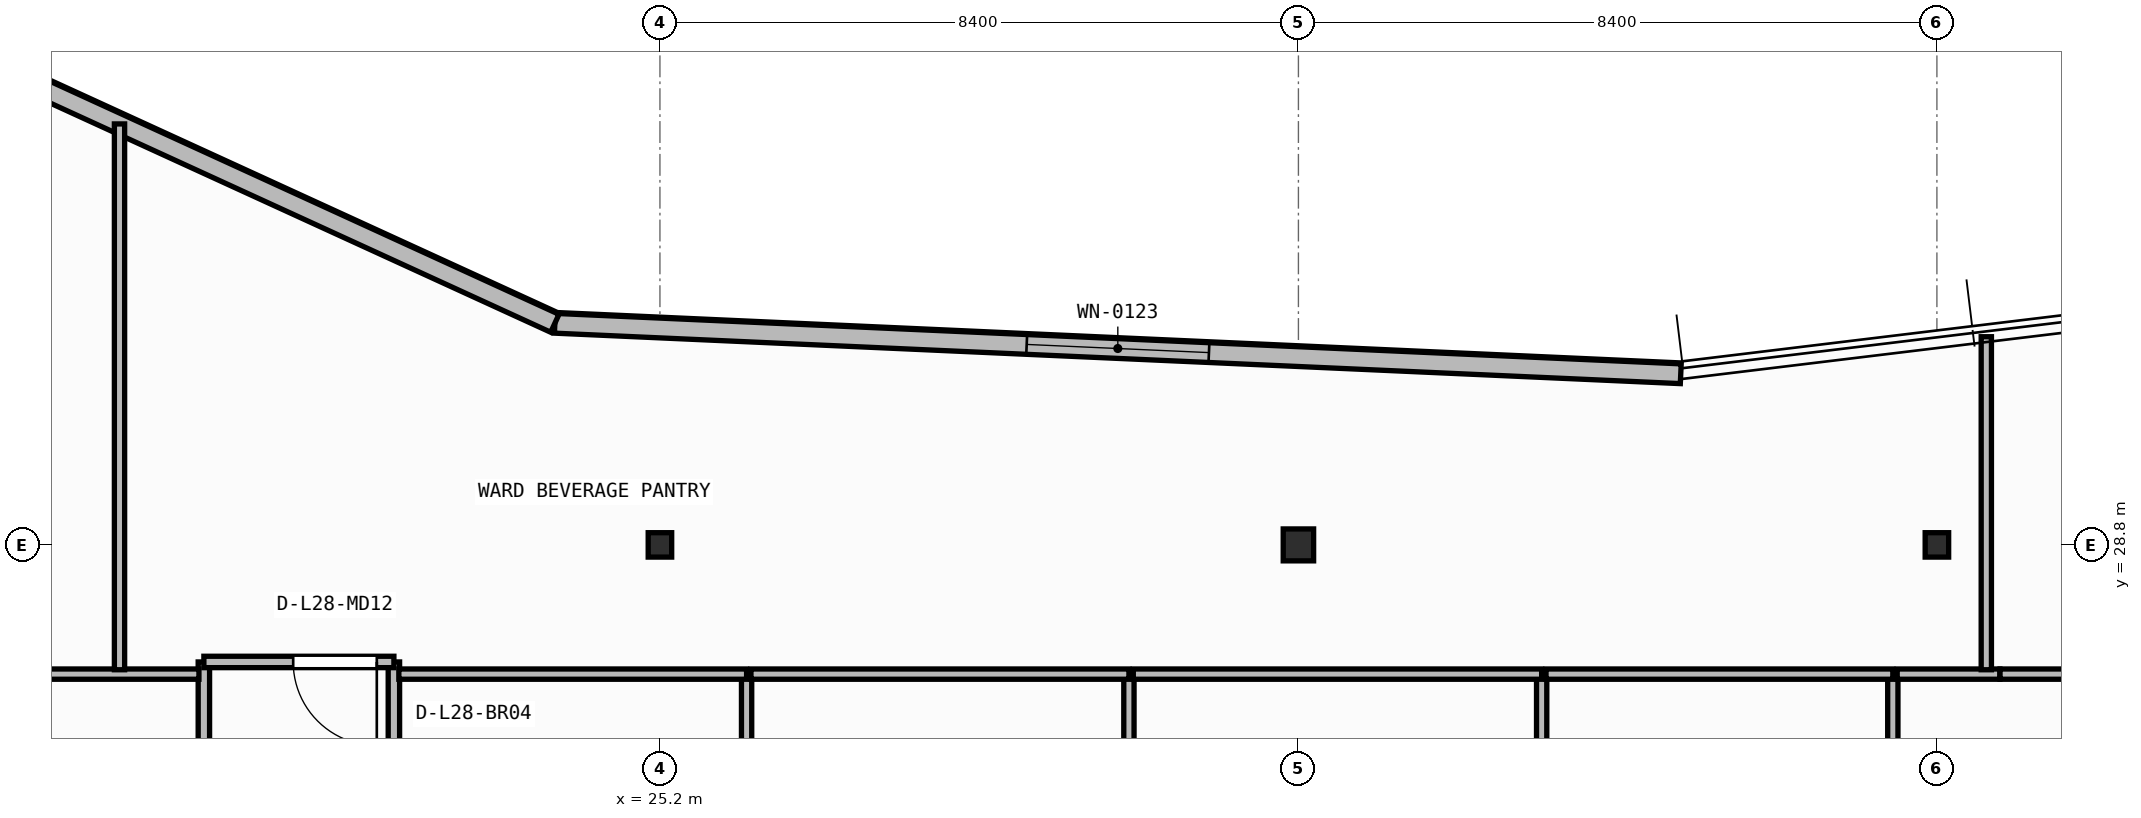
"""IFC4 building model, lengths in metres.
Left out: names, types, materials, properties, quantities, classifications, styles, units other than length and angle.
Written with IfcOpenShell. Run it as: python <this file> out.ifc"""

import sys

from ifc_helpers import new_model, si_unit, direction, frame, frame_2d, origin, origin_2d, place, context, subcontext, project, spatial, rectangle, i_section, extrude, element, fill, save


model = new_model("IFC4")
c1 = context("Model", 3, precision=1e-05, world=origin(), true_north=direction((0.0, 1.0)))
c2 = subcontext(c1, "Body", "Model", "MODEL_VIEW")
j1 = project(units=[si_unit("LENGTHUNIT", "METRE"), si_unit("PLANEANGLEUNIT", "RADIAN")], contexts=[c1])
p1 = place(None, origin())
s1 = spatial("IfcSite", under=j1, at=p1, CompositionType="ELEMENT")
p2 = place(p1, origin())
s2 = spatial("IfcBuilding", under=s1, at=p2, CompositionType="ELEMENT")
p3 = place(p2, frame((0.0, 0.0, 115.2)))
s3 = spatial("IfcBuildingStorey", under=s2, at=p3, CompositionType="ELEMENT", Elevation=115.2)
p4 = place(p3, frame((25.2, 28.8, 0.0), z_axis=(0.0, 0.0, 1.0), x_axis=(1.0, 0.0, 0.0)))
e1 = element("IfcColumn", 1, at=p4, inside=s3, PredefinedType="COLUMN", context=c2, shape_type="SweptSolid", body=[
    extrude(i_section(OverallWidth=0.309, OverallDepth=0.321, WebThickness=0.014, FlangeThickness=0.022, FilletRadius=0.017, at=origin_2d()), origin(), (0.0, 0.0, 1.0), 3.95),
])
p5 = place(p3, frame((33.6, 28.8, 0.0), z_axis=(0.0, 0.0, 1.0), x_axis=(1.0, 0.0, 0.0)))
e2 = element("IfcColumn", 2, at=p5, inside=s3, PredefinedType="COLUMN", context=c2, shape_type="SweptSolid", body=[
    extrude(i_section(OverallWidth=0.4, OverallDepth=0.42, WebThickness=0.025, FlangeThickness=0.04, at=origin_2d()), origin(), (0.0, 0.0, 1.0), 3.95),
])
p6 = place(p3, frame((42.0, 28.8, 0.0), z_axis=(0.0, 0.0, 1.0), x_axis=(1.0, 0.0, 0.0)))
e3 = element("IfcColumn", 3, at=p6, inside=s3, PredefinedType="COLUMN", context=c2, shape_type="SweptSolid", body=[
    extrude(i_section(OverallWidth=0.309, OverallDepth=0.321, WebThickness=0.014, FlangeThickness=0.022, FilletRadius=0.017, at=origin_2d()), origin(), (0.0, 0.0, 1.0), 3.95),
])
p7 = place(p3, frame((38.63, 31.052, 0.0), z_axis=(0.0, 0.0, 1.0), x_axis=(-0.998996592956, 0.044786239663, 0.0)))
e4 = element("IfcWall", 4, at=p7, inside=s3, PredefinedType="STANDARD", context=c2, shape_type="SweptSolid", body=[
    extrude(rectangle(XDim=14.827, YDim=0.26, at=frame_2d((7.414, 0.0))), origin(), (0.0, 0.0, 1.0), 3.71),
])
p8 = place(p7, frame((6.214, 0.0, 0.9)))
e5 = element("IfcOpeningElement", 5, at=p8, cuts=e4, PredefinedType="OPENING", context=c2, shape_type="SweptSolid", body=[
    extrude(rectangle(XDim=2.4, YDim=1.65, at=frame_2d((1.2, 0.825))), frame((0.0, 0.14, 0.0), z_axis=(0.0, -1.0, 0.0), x_axis=(1.0, 0.0, 0.0)), (0.0, 0.0, 1.0), 0.28),
])
p9 = place(p3, frame((23.818, 31.716, 0.0), z_axis=(0.0, 0.0, 1.0), x_axis=(-0.909209527513, 0.416338846471, 0.0)))
e6 = element("IfcWall", 6, at=p9, inside=s3, PredefinedType="STANDARD", context=c2, shape_type="SweptSolid", body=[
    extrude(rectangle(XDim=13.787, YDim=0.26, at=frame_2d((6.894, 0.0))), origin(), (0.0, 0.0, 1.0), 3.71),
])
p10 = place(p9, frame((8.854, 0.0, 0.9)))
e7 = element("IfcOpeningElement", 7, at=p10, cuts=e6, PredefinedType="OPENING", context=c2, shape_type="SweptSolid", body=[
    extrude(rectangle(XDim=2.4, YDim=1.65, at=frame_2d((1.2, 0.825))), frame((0.0, 0.14, 0.0), z_axis=(0.0, -1.0, 0.0), x_axis=(1.0, 0.0, 0.0)), (0.0, 0.0, 1.0), 0.28),
])
p11 = place(p3, frame((19.2, 27.26, 0.0), z_axis=(0.0, 0.0, 1.0), x_axis=(0.0, -1.0, 0.0)))
e8 = element("IfcWall", 8, at=p11, inside=s3, PredefinedType="PARTITIONING", context=c2, shape_type="SweptSolid", body=[
    extrude(rectangle(XDim=6.482, YDim=0.15, at=frame_2d((3.241, 0.0))), origin(), (0.0, 0.0, 1.0), 3.71),
])
p12 = place(p11, frame((2.068, 0.0, 0.0)))
e9 = element("IfcOpeningElement", 9, at=p12, cuts=e8, PredefinedType="OPENING", context=c2, shape_type="SweptSolid", body=[
    extrude(rectangle(XDim=1.1, YDim=2.1, at=frame_2d((0.55, 1.05))), frame((0.0, 0.085, 0.0), z_axis=(0.0, -1.0, 0.0), x_axis=(1.0, 0.0, 0.0)), (0.0, 0.0, 1.0), 0.17),
])
p13 = place(p3, frame((21.7, 23.784, 0.0), z_axis=(0.0, 0.0, 1.0), x_axis=(0.0, 1.0, 0.0)))
e10 = element("IfcWall", 10, at=p13, inside=s3, PredefinedType="PARTITIONING", context=c2, shape_type="SweptSolid", body=[
    extrude(rectangle(XDim=3.476, YDim=0.15, at=frame_2d((1.738, 0.0))), origin(), (0.0, 0.0, 1.0), 3.71),
])
p14 = place(p13, frame((1.088, 0.0, 0.0)))
e11 = element("IfcOpeningElement", 11, at=p14, cuts=e10, PredefinedType="OPENING", context=c2, shape_type="SweptSolid", body=[
    extrude(rectangle(XDim=1.3, YDim=2.15, at=frame_2d((0.65, 1.075))), frame((0.0, 0.085, 0.0), z_axis=(0.0, -1.0, 0.0), x_axis=(1.0, 0.0, 0.0)), (0.0, 0.0, 1.0), 0.17),
])
p15 = place(p3, frame((21.7, 27.26, 0.0), z_axis=(0.0, 0.0, 1.0), x_axis=(-1.0, 0.0, 0.0)))
e12 = element("IfcWall", 12, at=p15, inside=s3, PredefinedType="PARTITIONING", context=c2, shape_type="SweptSolid", body=[
    extrude(rectangle(XDim=2.5, YDim=0.15, at=frame_2d((1.25, 0.0))), origin(), (0.0, 0.0, 1.0), 3.71),
])
p16 = place(p15, frame((0.225, 0.0, 0.0)))
e13 = element("IfcOpeningElement", 13, at=p16, cuts=e12, PredefinedType="OPENING", context=c2, shape_type="SweptSolid", body=[
    extrude(rectangle(XDim=1.1, YDim=2.1, at=frame_2d((0.55, 1.05))), frame((0.0, 0.085, 0.0), z_axis=(0.0, -1.0, 0.0), x_axis=(1.0, 0.0, 0.0)), (0.0, 0.0, 1.0), 0.17),
])
p17 = place(p3, frame((19.135, 27.1, 0.0), z_axis=(0.0, 0.0, 1.0), x_axis=(-1.0, 0.0, 0.0)))
e14 = element("IfcWall", 14, at=p17, inside=s3, PredefinedType="PARTITIONING", context=c2, shape_type="SweptSolid", body=[
    extrude(rectangle(XDim=10.667, YDim=0.135, at=frame_2d((5.334, 0.0))), origin(), (0.0, 0.0, 1.0), 3.71),
])
p18 = place(p3, frame((26.34, 23.802, 0.0), z_axis=(0.0, 0.0, 1.0), x_axis=(0.0, 1.0, 0.0)))
e15 = element("IfcWall", 15, at=p18, inside=s3, PredefinedType="PARTITIONING", context=c2, shape_type="SweptSolid", body=[
    extrude(rectangle(XDim=3.298, YDim=0.135, at=frame_2d((1.649, 0.0))), origin(), (0.0, 0.0, 1.0), 3.71),
])
p19 = place(p3, frame((26.34, 27.1, 0.0), z_axis=(0.0, 0.0, 1.0), x_axis=(-1.0, 0.0, 0.0)))
e16 = element("IfcWall", 16, at=p19, inside=s3, PredefinedType="PARTITIONING", context=c2, shape_type="SweptSolid", body=[
    extrude(rectangle(XDim=4.575, YDim=0.135, at=frame_2d((2.288, 0.0))), origin(), (0.0, 0.0, 1.0), 3.71),
])
p20 = place(p3, frame((31.37, 23.802, 0.0), z_axis=(0.0, 0.0, 1.0), x_axis=(0.0, 1.0, 0.0)))
e17 = element("IfcWall", 17, at=p20, inside=s3, PredefinedType="PARTITIONING", context=c2, shape_type="SweptSolid", body=[
    extrude(rectangle(XDim=3.298, YDim=0.135, at=frame_2d((1.649, 0.0))), origin(), (0.0, 0.0, 1.0), 3.71),
])
p21 = place(p3, frame((31.37, 27.1, 0.0), z_axis=(0.0, 0.0, 1.0), x_axis=(-1.0, 0.0, 0.0)))
e18 = element("IfcWall", 18, at=p21, inside=s3, PredefinedType="PARTITIONING", context=c2, shape_type="SweptSolid", body=[
    extrude(rectangle(XDim=4.973, YDim=0.135, at=frame_2d((2.486, 0.0))), origin(), (0.0, 0.0, 1.0), 3.71),
])
p22 = place(p3, frame((36.8, 20.715, 0.0), z_axis=(0.0, 0.0, 1.0), x_axis=(0.0, 1.0, 0.0)))
e19 = element("IfcWall", 19, at=p22, inside=s3, PredefinedType="PARTITIONING", context=c2, shape_type="SweptSolid", body=[
    extrude(rectangle(XDim=6.385, YDim=0.135, at=frame_2d((3.192, 0.0))), origin(), (0.0, 0.0, 1.0), 3.71),
])
p23 = place(p3, frame((36.8, 27.1, 0.0), z_axis=(0.0, 0.0, 1.0), x_axis=(-1.0, 0.0, 0.0)))
e20 = element("IfcWall", 20, at=p23, inside=s3, PredefinedType="PARTITIONING", context=c2, shape_type="SweptSolid", body=[
    extrude(rectangle(XDim=5.373, YDim=0.135, at=frame_2d((2.686, 0.0))), origin(), (0.0, 0.0, 1.0), 3.71),
])
p24 = place(p3, frame((41.42, 20.715, 0.0), z_axis=(0.0, 0.0, 1.0), x_axis=(0.0, 1.0, 0.0)))
e21 = element("IfcWall", 21, at=p24, inside=s3, PredefinedType="PARTITIONING", context=c2, shape_type="SweptSolid", body=[
    extrude(rectangle(XDim=6.385, YDim=0.135, at=frame_2d((3.192, 0.0))), origin(), (0.0, 0.0, 1.0), 3.71),
])
p25 = place(p3, frame((41.42, 27.1, 0.0), z_axis=(0.0, 0.0, 1.0), x_axis=(-1.0, 0.0, 0.0)))
e22 = element("IfcWall", 22, at=p25, inside=s3, PredefinedType="PARTITIONING", context=c2, shape_type="SweptSolid", body=[
    extrude(rectangle(XDim=4.562, YDim=0.135, at=frame_2d((2.281, 0.0))), origin(), (0.0, 0.0, 1.0), 3.71),
])
p26 = place(p3, frame((42.829, 27.1, 0.0), z_axis=(0.0, 0.0, 1.0), x_axis=(-1.0, 0.0, 0.0)))
e23 = element("IfcWall", 23, at=p26, inside=s3, PredefinedType="PARTITIONING", context=c2, shape_type="SweptSolid", body=[
    extrude(rectangle(XDim=1.351, YDim=0.135, at=frame_2d((0.676, 0.0))), origin(), (0.0, 0.0, 1.0), 3.71),
])
p27 = place(p3, frame((46.45, 27.1, 0.0), z_axis=(0.0, 0.0, 1.0), x_axis=(-1.0, 0.0, 0.0)))
e24 = element("IfcWall", 24, at=p27, inside=s3, PredefinedType="PARTITIONING", context=c2, shape_type="SweptSolid", body=[
    extrude(rectangle(XDim=3.619, YDim=0.135, at=frame_2d((1.81, 0.0))), origin(), (0.0, 0.0, 1.0), 3.71),
])
p28 = place(p27, frame((0.253, 0.0, 0.0)))
e25 = element("IfcOpeningElement", 25, at=p28, cuts=e24, PredefinedType="OPENING", context=c2, shape_type="SweptSolid", body=[
    extrude(rectangle(XDim=1.1, YDim=2.1, at=frame_2d((0.55, 1.05))), frame((0.0, 0.077, 0.0), z_axis=(0.0, -1.0, 0.0), x_axis=(1.0, 0.0, 0.0)), (0.0, 0.0, 1.0), 0.155),
])
p29 = place(p3, frame((18.09, 27.157, 0.0), z_axis=(0.0, 0.0, 1.0), x_axis=(0.0, 1.0, 0.0)))
e26 = element("IfcWall", 26, at=p29, inside=s3, PredefinedType="PARTITIONING", context=c2, shape_type="SweptSolid", body=[
    extrude(rectangle(XDim=7.181, YDim=0.135, at=frame_2d((3.59, 0.0))), origin(), (0.0, 0.0, 1.0), 3.71),
])
p30 = place(p3, frame((42.65, 27.157, 0.0), z_axis=(0.0, 0.0, 1.0), x_axis=(0.0, 1.0, 0.0)))
e27 = element("IfcWall", 27, at=p30, inside=s3, PredefinedType="PARTITIONING", context=c2, shape_type="SweptSolid", body=[
    extrude(rectangle(XDim=4.381, YDim=0.135, at=frame_2d((2.191, 0.0))), origin(), (0.0, 0.0, 1.0), 3.71),
])
p31 = place(p8, origin())
e28 = element("IfcWindow", 28, at=p31, inside=s3, PartitioningType="SINGLE_PANEL", PredefinedType="WINDOW", context=c2, shape_type="SweptSolid", body=[
    extrude(rectangle(XDim=2.4, YDim=1.65, at=frame_2d((1.2, 0.825))), frame((0.0, 0.03, 0.0), z_axis=(0.0, -1.0, 0.0), x_axis=(1.0, 0.0, 0.0)), (0.0, 0.0, 1.0), 0.06),
])
fill(e5, e28)
p32 = place(p16, origin())
e29 = element("IfcDoor", 29, at=p32, inside=s3, OperationType="SINGLE_SWING_LEFT", PredefinedType="DOOR", context=c2, shape_type="SweptSolid", body=[
    extrude(rectangle(XDim=1.1, YDim=2.1, at=frame_2d((0.55, 1.05))), frame((0.0, 0.025, 0.0), z_axis=(0.0, -1.0, 0.0), x_axis=(1.0, 0.0, 0.0)), (0.0, 0.0, 1.0), 0.05),
])
fill(e13, e29)
save(model, sys.argv[1])
